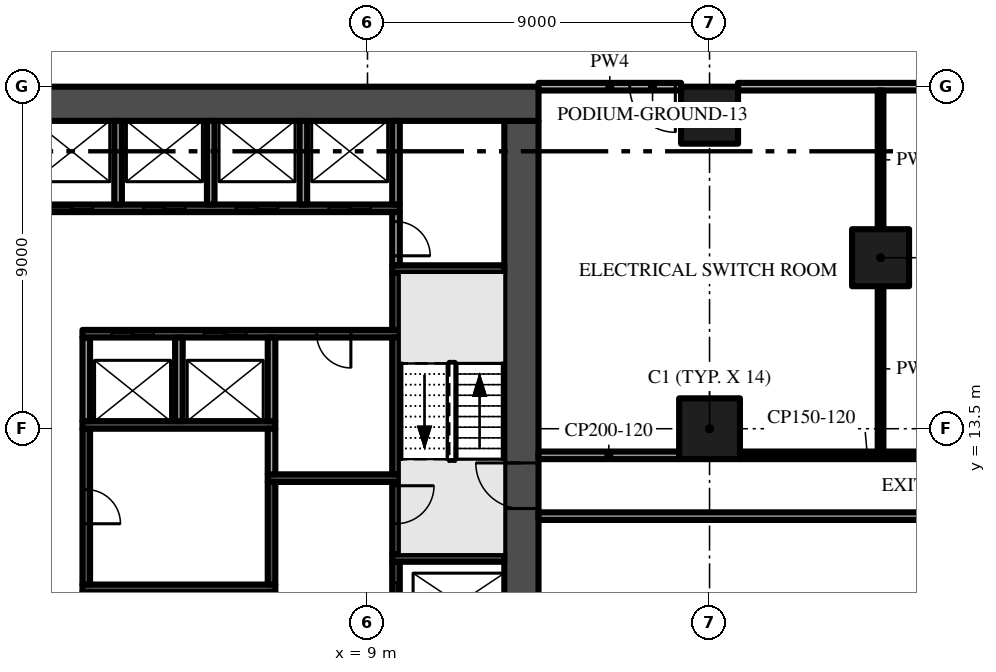
"""IFC4 building model, lengths in metres.
Left out: names, types, materials, properties, quantities, classifications, styles, units other than length and angle.
Written with IfcOpenShell. Run it as: python <this file> out.ifc"""

import sys

from ifc_helpers import new_model, si_unit, direction, frame, frame_2d, origin, origin_2d, place, context, subcontext, project, spatial, rectangle, extrude, element, fill, save


model = new_model("IFC4")
c1 = context("Model", 3, precision=1e-05, world=origin(), true_north=direction((0.0, 1.0)))
c2 = subcontext(c1, "Body", "Model", "MODEL_VIEW")
j1 = project(units=[si_unit("LENGTHUNIT", "METRE"), si_unit("PLANEANGLEUNIT", "RADIAN")], contexts=[c1])
p1 = place(None, origin())
s1 = spatial("IfcSite", under=j1, at=p1, CompositionType="ELEMENT")
p2 = place(p1, origin())
s2 = spatial("IfcBuilding", under=s1, at=p2, CompositionType="ELEMENT")
p3 = place(p2, origin())
s3 = spatial("IfcBuildingStorey", under=s2, at=p3, CompositionType="ELEMENT", Elevation=0.0)
p4 = place(p3, frame((13.05, 5.4, -2.2), z_axis=(0.0, 0.0, 1.0), x_axis=(0.0, 1.0, 0.0)))
e1 = element("IfcWall", 1, at=p4, inside=s3, PredefinedType="SHEAR", context=c2, shape_type="SweptSolid", body=[
    extrude(rectangle(XDim=16.2, YDim=0.9, at=frame_2d((8.1, 0.0))), origin(), (0.0, 0.0, 1.0), 7.8),
])
p5 = place(p4, frame((6.0, 0.0, 2.2)))
e2 = element("IfcOpeningElement", 2, at=p5, cuts=e1, PredefinedType="OPENING", context=c2, shape_type="SweptSolid", body=[
    extrude(rectangle(XDim=1.2, YDim=2.2, at=frame_2d((0.6, 1.1))), frame((0.0, 0.46, 0.0), z_axis=(0.0, -1.0, 0.0), x_axis=(1.0, 0.0, 0.0)), (0.0, 0.0, 1.0), 0.92),
])
p6 = place(p3, frame((13.5, 22.05, -2.2), z_axis=(0.0, 0.0, 1.0), x_axis=(-1.0, 0.0, 0.0)))
e3 = element("IfcWall", 3, at=p6, inside=s3, PredefinedType="SHEAR", context=c2, shape_type="SweptSolid", body=[
    extrude(rectangle(XDim=27.0, YDim=0.9, at=frame_2d((13.5, 0.0))), origin(), (0.0, 0.0, 1.0), 7.8),
])
p7 = place(p3, frame((18.0, 13.5, 0.0), z_axis=(0.0, 0.0, 1.0), x_axis=(1.0, 0.0, 0.0)))
e4 = element("IfcColumn", 4, at=p7, inside=s3, PredefinedType="COLUMN", context=c2, shape_type="SweptSolid", body=[
    extrude(rectangle(XDim=1.6, YDim=1.6, at=origin_2d()), origin(), (0.0, 0.0, 1.0), 5.6),
])
for number, where, z_axis, x_axis in (
    (5, (18.0, 21.75, 0.0), (0.0, 0.0, 1.0), (1.0, 0.0, 0.0)),
    (6, (22.5, 18.0, 0.0), (0.0, 0.0, 1.0), (1.0, 0.0, 0.0)),
):
    element("IfcColumn", number, at=place(p3, frame(where, z_axis=z_axis, x_axis=x_axis)), inside=s3, PredefinedType="COLUMN", context=c2, shape_type="SweptSolid", body=[
        extrude(rectangle(XDim=1.5, YDim=1.5, at=origin_2d()), origin(), (0.0, 0.0, 1.0), 5.6),
    ])
p8 = place(p3, frame((-9.85, 19.3, -0.4), z_axis=(0.0, 0.0, 1.0), x_axis=(1.0, 0.0, 0.0)))
e7 = element("IfcWall", 7, at=p8, inside=s3, PredefinedType="SHEAR", context=c2, shape_type="SweptSolid", body=[
    extrude(rectangle(XDim=19.7, YDim=0.2, at=frame_2d((9.85, 0.0))), origin(), (0.0, 0.0, 1.0), 6.0),
])
p9 = place(p8, frame((0.769, 0.0, 0.4)))
e8 = element("IfcOpeningElement", 8, at=p9, cuts=e7, PredefinedType="OPENING", context=c2, shape_type="SweptSolid", body=[
    extrude(rectangle(XDim=1.1, YDim=2.1, at=frame_2d((0.55, 1.05))), frame((0.0, 0.11, 0.0), z_axis=(0.0, -1.0, 0.0), x_axis=(1.0, 0.0, 0.0)), (0.0, 0.0, 1.0), 0.22),
])
p10 = place(p8, frame((3.206, 0.0, 0.4)))
e9 = element("IfcOpeningElement", 9, at=p10, cuts=e7, PredefinedType="OPENING", context=c2, shape_type="SweptSolid", body=[
    extrude(rectangle(XDim=1.1, YDim=2.1, at=frame_2d((0.55, 1.05))), frame((0.0, 0.11, 0.0), z_axis=(0.0, -1.0, 0.0), x_axis=(1.0, 0.0, 0.0)), (0.0, 0.0, 1.0), 0.22),
])
p11 = place(p8, frame((5.644, 0.0, 0.4)))
e10 = element("IfcOpeningElement", 10, at=p11, cuts=e7, PredefinedType="OPENING", context=c2, shape_type="SweptSolid", body=[
    extrude(rectangle(XDim=1.1, YDim=2.1, at=frame_2d((0.55, 1.05))), frame((0.0, 0.11, 0.0), z_axis=(0.0, -1.0, 0.0), x_axis=(1.0, 0.0, 0.0)), (0.0, 0.0, 1.0), 0.22),
])
p12 = place(p8, frame((8.081, 0.0, 0.4)))
e11 = element("IfcOpeningElement", 11, at=p12, cuts=e7, PredefinedType="OPENING", context=c2, shape_type="SweptSolid", body=[
    extrude(rectangle(XDim=1.1, YDim=2.1, at=frame_2d((0.55, 1.05))), frame((0.0, 0.11, 0.0), z_axis=(0.0, -1.0, 0.0), x_axis=(1.0, 0.0, 0.0)), (0.0, 0.0, 1.0), 0.22),
])
p13 = place(p8, frame((10.519, 0.0, 0.4)))
e12 = element("IfcOpeningElement", 12, at=p13, cuts=e7, PredefinedType="OPENING", context=c2, shape_type="SweptSolid", body=[
    extrude(rectangle(XDim=1.1, YDim=2.1, at=frame_2d((0.55, 1.05))), frame((0.0, 0.11, 0.0), z_axis=(0.0, -1.0, 0.0), x_axis=(1.0, 0.0, 0.0)), (0.0, 0.0, 1.0), 0.22),
])
p14 = place(p8, frame((12.956, 0.0, 0.4)))
e13 = element("IfcOpeningElement", 13, at=p14, cuts=e7, PredefinedType="OPENING", context=c2, shape_type="SweptSolid", body=[
    extrude(rectangle(XDim=1.1, YDim=2.1, at=frame_2d((0.55, 1.05))), frame((0.0, 0.11, 0.0), z_axis=(0.0, -1.0, 0.0), x_axis=(1.0, 0.0, 0.0)), (0.0, 0.0, 1.0), 0.22),
])
p15 = place(p8, frame((15.394, 0.0, 0.4)))
e14 = element("IfcOpeningElement", 14, at=p15, cuts=e7, PredefinedType="OPENING", context=c2, shape_type="SweptSolid", body=[
    extrude(rectangle(XDim=1.1, YDim=2.1, at=frame_2d((0.55, 1.05))), frame((0.0, 0.11, 0.0), z_axis=(0.0, -1.0, 0.0), x_axis=(1.0, 0.0, 0.0)), (0.0, 0.0, 1.0), 0.22),
])
p16 = place(p8, frame((17.831, 0.0, 0.4)))
e15 = element("IfcOpeningElement", 15, at=p16, cuts=e7, PredefinedType="OPENING", context=c2, shape_type="SweptSolid", body=[
    extrude(rectangle(XDim=1.1, YDim=2.1, at=frame_2d((0.55, 1.05))), frame((0.0, 0.11, 0.0), z_axis=(0.0, -1.0, 0.0), x_axis=(1.0, 0.0, 0.0)), (0.0, 0.0, 1.0), 0.22),
])
p17 = place(p3, frame((1.5, 9.3, -0.4), z_axis=(0.0, 0.0, 1.0), x_axis=(1.0, 0.0, 0.0)))
e16 = element("IfcWall", 16, at=p17, inside=s3, PredefinedType="SHEAR", context=c2, shape_type="SweptSolid", body=[
    extrude(rectangle(XDim=5.075, YDim=0.2, at=frame_2d((2.538, 0.0))), origin(), (0.0, 0.0, 1.0), 6.0),
])
p18 = place(p3, frame((1.6, 13.5, -0.4), z_axis=(0.0, 0.0, 1.0), x_axis=(0.0, -1.0, 0.0)))
e17 = element("IfcWall", 17, at=p18, inside=s3, PredefinedType="SHEAR", context=c2, shape_type="SweptSolid", body=[
    extrude(rectangle(XDim=4.1, YDim=0.2, at=frame_2d((2.05, 0.0))), origin(), (0.0, 0.0, 1.0), 6.0),
])
p19 = place(p18, frame((1.6, 0.0, 0.4)))
e18 = element("IfcOpeningElement", 18, at=p19, cuts=e17, PredefinedType="OPENING", context=c2, shape_type="SweptSolid", body=[
    extrude(rectangle(XDim=0.9, YDim=2.1, at=frame_2d((0.45, 1.05))), frame((0.0, 0.11, 0.0), z_axis=(0.0, -1.0, 0.0), x_axis=(1.0, 0.0, 0.0)), (0.0, 0.0, 1.0), 0.22),
])
p20 = place(p3, frame((1.5, 13.6, -0.4), z_axis=(0.0, 0.0, 1.0), x_axis=(1.0, 0.0, 0.0)))
e19 = element("IfcWall", 19, at=p20, inside=s3, PredefinedType="SHEAR", context=c2, shape_type="SweptSolid", body=[
    extrude(rectangle(XDim=5.075, YDim=0.2, at=frame_2d((2.538, 0.0))), origin(), (0.0, 0.0, 1.0), 6.0),
])
p21 = place(p3, frame((1.6, 13.7, -0.4), z_axis=(0.0, 0.0, 1.0), x_axis=(0.0, 1.0, 0.0)))
e20 = element("IfcWall", 20, at=p21, inside=s3, PredefinedType="PARTITIONING", context=c2, shape_type="SweptSolid", body=[
    extrude(rectangle(XDim=2.2, YDim=0.2, at=frame_2d((1.1, 0.0))), origin(), (0.0, 0.0, 1.0), 6.0),
])
p22 = place(p3, frame((9.85, 16.0, -0.4), z_axis=(0.0, 0.0, 1.0), x_axis=(-1.0, 0.0, 0.0)))
e21 = element("IfcWall", 21, at=p22, inside=s3, PredefinedType="SHEAR", context=c2, shape_type="SweptSolid", body=[
    extrude(rectangle(XDim=8.35, YDim=0.2, at=frame_2d((4.175, 0.0))), origin(), (0.0, 0.0, 1.0), 6.0),
])
p23 = place(p22, frame((6.481, 0.0, 0.4)))
e22 = element("IfcOpeningElement", 22, at=p23, cuts=e21, PredefinedType="OPENING", context=c2, shape_type="SweptSolid", body=[
    extrude(rectangle(XDim=1.1, YDim=2.1, at=frame_2d((0.55, 1.05))), frame((0.0, 0.11, 0.0), z_axis=(0.0, -1.0, 0.0), x_axis=(1.0, 0.0, 0.0)), (0.0, 0.0, 1.0), 0.22),
])
p24 = place(p22, frame((4.044, 0.0, 0.4)))
e23 = element("IfcOpeningElement", 23, at=p24, cuts=e21, PredefinedType="OPENING", context=c2, shape_type="SweptSolid", body=[
    extrude(rectangle(XDim=1.1, YDim=2.1, at=frame_2d((0.55, 1.05))), frame((0.0, 0.11, 0.0), z_axis=(0.0, -1.0, 0.0), x_axis=(1.0, 0.0, 0.0)), (0.0, 0.0, 1.0), 0.22),
])
p25 = place(p22, frame((1.288, 0.0, 0.4)))
e24 = element("IfcOpeningElement", 24, at=p25, cuts=e21, PredefinedType="OPENING", context=c2, shape_type="SweptSolid", body=[
    extrude(rectangle(XDim=0.9, YDim=2.1, at=frame_2d((0.45, 1.05))), frame((0.0, 0.11, 0.0), z_axis=(0.0, -1.0, 0.0), x_axis=(1.0, 0.0, 0.0)), (0.0, 0.0, 1.0), 0.22),
])
for number, where, z_axis, x_axis in (
    (25, (2.438, 19.4, -0.4), (0.0, 0.0, 1.0), (0.0, 1.0, 0.0)),
    (26, (4.037, 13.7, -0.4), (0.0, 0.0, 1.0), (0.0, 1.0, 0.0)),
    (27, (4.875, 19.4, -0.4), (0.0, 0.0, 1.0), (0.0, 1.0, 0.0)),
):
    element("IfcWall", number, at=place(p3, frame(where, z_axis=z_axis, x_axis=x_axis)), inside=s3, PredefinedType="PARTITIONING", context=c2, shape_type="SweptSolid", body=[
        extrude(rectangle(XDim=2.2, YDim=0.2, at=frame_2d((1.1, 0.0))), origin(), (0.0, 0.0, 1.0), 6.0),
    ])
p26 = place(p3, frame((6.475, 9.4, -0.4), z_axis=(0.0, 0.0, 1.0), x_axis=(0.0, 1.0, 0.0)))
e28 = element("IfcWall", 28, at=p26, inside=s3, PredefinedType="SHEAR", context=c2, shape_type="SweptSolid", body=[
    extrude(rectangle(XDim=2.7, YDim=0.2, at=frame_2d((1.35, 0.0))), origin(), (0.0, 0.0, 1.0), 6.0),
])
p27 = place(p3, frame((6.375, 12.2, -0.4), z_axis=(0.0, 0.0, 1.0), x_axis=(1.0, 0.0, 0.0)))
e29 = element("IfcWall", 29, at=p27, inside=s3, PredefinedType="SHEAR", context=c2, shape_type="SweptSolid", body=[
    extrude(rectangle(XDim=3.475, YDim=0.2, at=frame_2d((1.738, 0.0))), origin(), (0.0, 0.0, 1.0), 6.0),
])
p28 = place(p3, frame((6.475, 12.3, 0.0), z_axis=(0.0, 0.0, 1.0), x_axis=(0.0, 1.0, 0.0)))
e30 = element("IfcWall", 30, at=p28, inside=s3, PredefinedType="PARTITIONING", context=c2, shape_type="SweptSolid", body=[
    extrude(rectangle(XDim=1.2, YDim=0.2, at=frame_2d((0.6, 0.0))), origin(), (0.0, 0.0, 1.0), 5.6),
])
for number, where, z_axis, x_axis in (
    (31, (6.475, 13.7, -0.4), (0.0, 0.0, 1.0), (0.0, 1.0, 0.0)),
    (32, (7.312, 19.4, -0.4), (0.0, 0.0, 1.0), (0.0, 1.0, 0.0)),
):
    element("IfcWall", number, at=place(p3, frame(where, z_axis=z_axis, x_axis=x_axis)), inside=s3, PredefinedType="PARTITIONING", context=c2, shape_type="SweptSolid", body=[
        extrude(rectangle(XDim=2.2, YDim=0.2, at=frame_2d((1.1, 0.0))), origin(), (0.0, 0.0, 1.0), 6.0),
    ])
p29 = place(p3, frame((9.75, 7.8, -0.4), z_axis=(0.0, 0.0, 1.0), x_axis=(0.0, 1.0, 0.0)))
e33 = element("IfcWall", 33, at=p29, inside=s3, PredefinedType="SHEAR", context=c2, shape_type="SweptSolid", body=[
    extrude(rectangle(XDim=2.2, YDim=0.2, at=frame_2d((1.1, 0.0))), origin(), (0.0, 0.0, 1.0), 6.0),
])
p30 = place(p29, frame((0.55, 0.0, 0.4)))
e34 = element("IfcOpeningElement", 34, at=p30, cuts=e33, PredefinedType="OPENING", context=c2, shape_type="SweptSolid", body=[
    extrude(rectangle(XDim=1.1, YDim=2.1, at=frame_2d((0.55, 1.05))), frame((0.0, 0.11, 0.0), z_axis=(0.0, -1.0, 0.0), x_axis=(1.0, 0.0, 0.0)), (0.0, 0.0, 1.0), 0.22),
])
p31 = place(p3, frame((9.65, 10.1, -0.4), z_axis=(0.0, 0.0, 1.0), x_axis=(1.0, 0.0, 0.0)))
e35 = element("IfcWall", 35, at=p31, inside=s3, PredefinedType="SHEAR", context=c2, shape_type="SweptSolid", body=[
    extrude(rectangle(XDim=2.95, YDim=0.2, at=frame_2d((1.475, 0.0))), origin(), (0.0, 0.0, 1.0), 6.0),
])
p32 = place(p3, frame((9.75, 12.1, -0.4), z_axis=(0.0, 0.0, 1.0), x_axis=(0.0, -1.0, 0.0)))
e36 = element("IfcWall", 36, at=p32, inside=s3, PredefinedType="SHEAR", context=c2, shape_type="SweptSolid", body=[
    extrude(rectangle(XDim=1.9, YDim=0.2, at=frame_2d((0.95, 0.0))), origin(), (0.0, 0.0, 1.0), 6.0),
])
p33 = place(p32, frame((0.1, 0.0, 0.4)))
e37 = element("IfcOpeningElement", 37, at=p33, cuts=e36, PredefinedType="OPENING", context=c2, shape_type="SweptSolid", body=[
    extrude(rectangle(XDim=1.0, YDim=2.2, at=frame_2d((0.5, 1.1))), frame((0.0, 0.11, 0.0), z_axis=(0.0, -1.0, 0.0), x_axis=(1.0, 0.0, 0.0)), (0.0, 0.0, 1.0), 0.22),
])
p34 = place(p3, frame((9.75, 12.3, -0.4), z_axis=(0.0, 0.0, 1.0), x_axis=(0.0, 1.0, 0.0)))
e38 = element("IfcWall", 38, at=p34, inside=s3, PredefinedType="SHEAR", context=c2, shape_type="SweptSolid", body=[
    extrude(rectangle(XDim=3.6, YDim=0.2, at=frame_2d((1.8, 0.0))), origin(), (0.0, 0.0, 1.0), 6.0),
])
p35 = place(p3, frame((9.75, 16.1, -0.4), z_axis=(0.0, 0.0, 1.0), x_axis=(0.0, 1.0, 0.0)))
e39 = element("IfcWall", 39, at=p35, inside=s3, PredefinedType="SHEAR", context=c2, shape_type="SweptSolid", body=[
    extrude(rectangle(XDim=1.5, YDim=0.2, at=frame_2d((0.75, 0.0))), origin(), (0.0, 0.0, 1.0), 6.0),
])
p36 = place(p3, frame((9.65, 17.7, -0.4), z_axis=(0.0, 0.0, 1.0), x_axis=(1.0, 0.0, 0.0)))
e40 = element("IfcWall", 40, at=p36, inside=s3, PredefinedType="SHEAR", context=c2, shape_type="SweptSolid", body=[
    extrude(rectangle(XDim=2.95, YDim=0.2, at=frame_2d((1.475, 0.0))), origin(), (0.0, 0.0, 1.0), 6.0),
])
p37 = place(p3, frame((9.75, 19.2, 0.0), z_axis=(0.0, 0.0, 1.0), x_axis=(0.0, -1.0, 0.0)))
e41 = element("IfcWall", 41, at=p37, inside=s3, PredefinedType="PARTITIONING", context=c2, shape_type="SweptSolid", body=[
    extrude(rectangle(XDim=1.4, YDim=0.2, at=frame_2d((0.7, 0.0))), origin(), (0.0, 0.0, 1.0), 5.6),
])
p38 = place(p37, frame((0.25, 0.0, 0.0)))
e42 = element("IfcOpeningElement", 42, at=p38, cuts=e41, PredefinedType="OPENING", context=c2, shape_type="SweptSolid", body=[
    extrude(rectangle(XDim=0.9, YDim=2.1, at=frame_2d((0.45, 1.05))), frame((0.0, 0.11, 0.0), z_axis=(0.0, -1.0, 0.0), x_axis=(1.0, 0.0, 0.0)), (0.0, 0.0, 1.0), 0.22),
])
p39 = place(p3, frame((9.75, 19.4, -0.4), z_axis=(0.0, 0.0, 1.0), x_axis=(0.0, 1.0, 0.0)))
e43 = element("IfcWall", 43, at=p39, inside=s3, PredefinedType="PARTITIONING", context=c2, shape_type="SweptSolid", body=[
    extrude(rectangle(XDim=2.2, YDim=0.2, at=frame_2d((1.1, 0.0))), origin(), (0.0, 0.0, 1.0), 6.0),
])
p40 = place(p3, frame((13.5, 11.2, 0.0), z_axis=(0.0, 0.0, 1.0), x_axis=(1.0, 0.0, 0.0)))
e44 = element("IfcWall", 44, at=p40, inside=s3, PredefinedType="PARTITIONING", context=c2, shape_type="SweptSolid", body=[
    extrude(rectangle(XDim=22.2, YDim=0.2, at=frame_2d((11.1, 0.0))), origin(), (0.0, 0.0, 1.0), 5.6),
])
p41 = place(p3, frame((13.5, 12.8, 0.0), z_axis=(0.0, 0.0, 1.0), x_axis=(1.0, 0.0, 0.0)))
e45 = element("IfcWall", 45, at=p41, inside=s3, PredefinedType="PARTITIONING", context=c2, shape_type="SweptSolid", body=[
    extrude(rectangle(XDim=3.7, YDim=0.2, at=frame_2d((1.85, 0.0))), origin(), (0.0, 0.0, 1.0), 5.6),
])
p42 = place(p3, frame((18.8, 12.725, 0.0), z_axis=(0.0, 0.0, 1.0), x_axis=(1.0, 0.0, 0.0)))
e46 = element("IfcWall", 46, at=p42, inside=s3, PredefinedType="PARTITIONING", context=c2, shape_type="SweptSolid", body=[
    extrude(rectangle(XDim=16.9, YDim=0.05, at=frame_2d((8.45, 0.0))), origin(), (0.0, 0.0, 1.0), 5.6),
])
p43 = place(p3, frame((18.8, 12.825, 0.0), z_axis=(0.0, 0.0, 1.0), x_axis=(1.0, 0.0, 0.0)))
e47 = element("IfcWall", 47, at=p43, inside=s3, PredefinedType="PARTITIONING", context=c2, shape_type="SweptSolid", body=[
    extrude(rectangle(XDim=6.7, YDim=0.15, at=frame_2d((3.35, 0.0))), origin(), (0.0, 0.0, 1.0), 5.6),
])
p44 = place(p3, frame((17.25, 22.5, 0.0), z_axis=(0.0, 0.0, 1.0), x_axis=(-1.0, 0.0, 0.0)))
e48 = element("IfcWall", 48, at=p44, inside=s3, PredefinedType="PARTITIONING", context=c2, shape_type="SweptSolid", body=[
    extrude(rectangle(XDim=3.75, YDim=0.2, at=frame_2d((1.875, 0.0))), origin(), (0.0, 0.0, 1.0), 5.6),
])
p45 = place(p44, frame((0.15, 0.0, 0.0)))
e49 = element("IfcOpeningElement", 49, at=p45, cuts=e48, PredefinedType="OPENING", context=c2, shape_type="SweptSolid", body=[
    extrude(rectangle(XDim=1.2, YDim=2.4, at=frame_2d((0.6, 1.2))), frame((0.0, 0.11, 0.0), z_axis=(0.0, -1.0, 0.0), x_axis=(1.0, 0.0, 0.0)), (0.0, 0.0, 1.0), 0.22),
])
p46 = place(p3, frame((34.8, 22.5, 0.0), z_axis=(0.0, 0.0, 1.0), x_axis=(-1.0, 0.0, 0.0)))
e50 = element("IfcWall", 50, at=p46, inside=s3, PredefinedType="PARTITIONING", context=c2, shape_type="SweptSolid", body=[
    extrude(rectangle(XDim=16.05, YDim=0.2, at=frame_2d((8.025, 0.0))), origin(), (0.0, 0.0, 1.0), 5.6),
])
p47 = place(p46, frame((4.95, 0.0, 0.0)))
e51 = element("IfcOpeningElement", 51, at=p47, cuts=e50, PredefinedType="OPENING", context=c2, shape_type="SweptSolid", body=[
    extrude(rectangle(XDim=1.2, YDim=2.4, at=frame_2d((0.6, 1.2))), frame((0.0, 0.11, 0.0), z_axis=(0.0, -1.0, 0.0), x_axis=(1.0, 0.0, 0.0)), (0.0, 0.0, 1.0), 0.22),
])
p48 = place(p3, frame((22.5, 12.9, 0.0), z_axis=(0.0, 0.0, 1.0), x_axis=(0.0, 1.0, 0.0)))
e52 = element("IfcWall", 52, at=p48, inside=s3, PredefinedType="PARTITIONING", context=c2, shape_type="SweptSolid", body=[
    extrude(rectangle(XDim=4.35, YDim=0.15, at=frame_2d((2.175, 0.0))), origin(), (0.0, 0.0, 1.0), 5.6),
])
p49 = place(p3, frame((22.5, 18.75, 0.0), z_axis=(0.0, 0.0, 1.0), x_axis=(0.0, 1.0, 0.0)))
e53 = element("IfcWall", 53, at=p49, inside=s3, PredefinedType="PARTITIONING", context=c2, shape_type="SweptSolid", body=[
    extrude(rectangle(XDim=3.65, YDim=0.15, at=frame_2d((1.825, 0.0))), origin(), (0.0, 0.0, 1.0), 5.6),
])
p50 = place(p5, frame((1.2, 0.0, 0.0), z_axis=(0.0, 0.0, 1.0), x_axis=(-1.0, 0.0, 0.0)))
e54 = element("IfcDoor", 54, at=p50, inside=s3, OperationType="SINGLE_SWING_LEFT", PredefinedType="DOOR", context=c2, shape_type="SweptSolid", body=[
    extrude(rectangle(XDim=1.2, YDim=2.2, at=frame_2d((0.6, 1.1))), frame((0.0, 0.025, 0.0), z_axis=(0.0, -1.0, 0.0), x_axis=(1.0, 0.0, 0.0)), (0.0, 0.0, 1.0), 0.05),
])
fill(e2, e54)
p51 = place(p33, origin())
e55 = element("IfcDoor", 55, at=p51, inside=s3, OperationType="SINGLE_SWING_LEFT", PredefinedType="DOOR", context=c2, shape_type="SweptSolid", body=[
    extrude(rectangle(XDim=1.0, YDim=2.2, at=frame_2d((0.5, 1.1))), frame((0.0, 0.025, 0.0), z_axis=(0.0, -1.0, 0.0), x_axis=(1.0, 0.0, 0.0)), (0.0, 0.0, 1.0), 0.05),
])
fill(e37, e55)
p52 = place(p13, origin())
e56 = element("IfcDoor", 56, at=p52, inside=s3, OperationType="SLIDING_TO_RIGHT", PredefinedType="DOOR", context=c2, shape_type="SweptSolid", body=[
    extrude(rectangle(XDim=1.1, YDim=2.1, at=frame_2d((0.55, 1.05))), frame((0.0, 0.025, 0.0), z_axis=(0.0, -1.0, 0.0), x_axis=(1.0, 0.0, 0.0)), (0.0, 0.0, 1.0), 0.05),
])
fill(e12, e56)
p53 = place(p14, origin())
e57 = element("IfcDoor", 57, at=p53, inside=s3, OperationType="SLIDING_TO_RIGHT", PredefinedType="DOOR", context=c2, shape_type="SweptSolid", body=[
    extrude(rectangle(XDim=1.1, YDim=2.1, at=frame_2d((0.55, 1.05))), frame((0.0, 0.025, 0.0), z_axis=(0.0, -1.0, 0.0), x_axis=(1.0, 0.0, 0.0)), (0.0, 0.0, 1.0), 0.05),
])
fill(e13, e57)
p54 = place(p15, origin())
e58 = element("IfcDoor", 58, at=p54, inside=s3, OperationType="SLIDING_TO_RIGHT", PredefinedType="DOOR", context=c2, shape_type="SweptSolid", body=[
    extrude(rectangle(XDim=1.1, YDim=2.1, at=frame_2d((0.55, 1.05))), frame((0.0, 0.025, 0.0), z_axis=(0.0, -1.0, 0.0), x_axis=(1.0, 0.0, 0.0)), (0.0, 0.0, 1.0), 0.05),
])
fill(e14, e58)
p55 = place(p16, origin())
e59 = element("IfcDoor", 59, at=p55, inside=s3, OperationType="SLIDING_TO_RIGHT", PredefinedType="DOOR", context=c2, shape_type="SweptSolid", body=[
    extrude(rectangle(XDim=1.1, YDim=2.1, at=frame_2d((0.55, 1.05))), frame((0.0, 0.025, 0.0), z_axis=(0.0, -1.0, 0.0), x_axis=(1.0, 0.0, 0.0)), (0.0, 0.0, 1.0), 0.05),
])
fill(e15, e59)
p56 = place(p23, origin())
e60 = element("IfcDoor", 60, at=p56, inside=s3, OperationType="SLIDING_TO_RIGHT", PredefinedType="DOOR", context=c2, shape_type="SweptSolid", body=[
    extrude(rectangle(XDim=1.1, YDim=2.1, at=frame_2d((0.55, 1.05))), frame((0.0, 0.025, 0.0), z_axis=(0.0, -1.0, 0.0), x_axis=(1.0, 0.0, 0.0)), (0.0, 0.0, 1.0), 0.05),
])
fill(e22, e60)
p57 = place(p24, origin())
e61 = element("IfcDoor", 61, at=p57, inside=s3, OperationType="SLIDING_TO_RIGHT", PredefinedType="DOOR", context=c2, shape_type="SweptSolid", body=[
    extrude(rectangle(XDim=1.1, YDim=2.1, at=frame_2d((0.55, 1.05))), frame((0.0, 0.025, 0.0), z_axis=(0.0, -1.0, 0.0), x_axis=(1.0, 0.0, 0.0)), (0.0, 0.0, 1.0), 0.05),
])
fill(e23, e61)
p58 = place(p30, origin())
e62 = element("IfcDoor", 62, at=p58, inside=s3, OperationType="SLIDING_TO_RIGHT", PredefinedType="DOOR", context=c2, shape_type="SweptSolid", body=[
    extrude(rectangle(XDim=1.1, YDim=2.1, at=frame_2d((0.55, 1.05))), frame((0.0, 0.025, 0.0), z_axis=(0.0, -1.0, 0.0), x_axis=(1.0, 0.0, 0.0)), (0.0, 0.0, 1.0), 0.05),
])
fill(e34, e62)
p59 = place(p19, origin())
e63 = element("IfcDoor", 63, at=p59, inside=s3, OperationType="SINGLE_SWING_RIGHT", PredefinedType="DOOR", context=c2, shape_type="SweptSolid", body=[
    extrude(rectangle(XDim=0.9, YDim=2.1, at=frame_2d((0.45, 1.05))), frame((0.0, 0.025, 0.0), z_axis=(0.0, -1.0, 0.0), x_axis=(1.0, 0.0, 0.0)), (0.0, 0.0, 1.0), 0.05),
])
fill(e18, e63)
p60 = place(p25, origin())
e64 = element("IfcDoor", 64, at=p60, inside=s3, OperationType="SINGLE_SWING_LEFT", PredefinedType="DOOR", context=c2, shape_type="SweptSolid", body=[
    extrude(rectangle(XDim=0.9, YDim=2.1, at=frame_2d((0.45, 1.05))), frame((0.0, 0.025, 0.0), z_axis=(0.0, -1.0, 0.0), x_axis=(1.0, 0.0, 0.0)), (0.0, 0.0, 1.0), 0.05),
])
fill(e24, e64)
p61 = place(p38, origin())
e65 = element("IfcDoor", 65, at=p61, inside=s3, OperationType="SINGLE_SWING_RIGHT", PredefinedType="DOOR", context=c2, shape_type="SweptSolid", body=[
    extrude(rectangle(XDim=0.9, YDim=2.1, at=frame_2d((0.45, 1.05))), frame((0.0, 0.025, 0.0), z_axis=(0.0, -1.0, 0.0), x_axis=(1.0, 0.0, 0.0)), (0.0, 0.0, 1.0), 0.05),
])
fill(e42, e65)
p62 = place(p45, origin())
e66 = element("IfcDoor", 66, at=p62, inside=s3, OperationType="SINGLE_SWING_LEFT", PredefinedType="DOOR", context=c2, shape_type="SweptSolid", body=[
    extrude(rectangle(XDim=1.2, YDim=2.4, at=frame_2d((0.6, 1.2))), frame((0.0, 0.025, 0.0), z_axis=(0.0, -1.0, 0.0), x_axis=(1.0, 0.0, 0.0)), (0.0, 0.0, 1.0), 0.05),
])
fill(e49, e66)
save(model, sys.argv[1])
